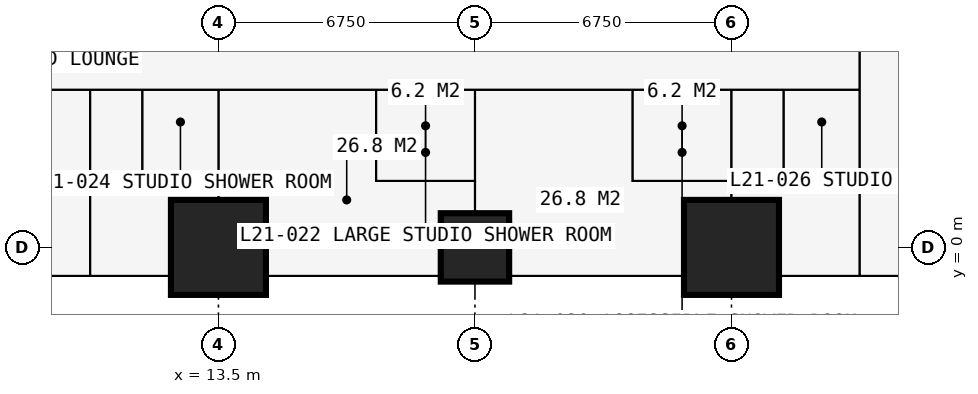
"""IFC4 building model, lengths in metres.
Left out: names, types, materials, properties, quantities, classifications, styles, units other than length and angle.
Written with IfcOpenShell. Run it as: python <this file> out.ifc"""

import sys

from ifc_helpers import new_model, si_unit, direction, frame, frame_2d, origin, origin_2d, place, context, subcontext, project, spatial, rectangle, extrude, element, fill, save


model = new_model("IFC4")
c1 = context("Model", 3, precision=1e-05, world=origin(), true_north=direction((0.0, 1.0)))
c2 = subcontext(c1, "Body", "Model", "MODEL_VIEW")
j1 = project(units=[si_unit("LENGTHUNIT", "METRE"), si_unit("PLANEANGLEUNIT", "RADIAN")], contexts=[c1])
p1 = place(None, origin())
s1 = spatial("IfcSite", under=j1, at=p1, CompositionType="ELEMENT")
p2 = place(p1, origin())
s2 = spatial("IfcBuilding", under=s1, at=p2, CompositionType="ELEMENT")
p3 = place(p2, frame((0.0, 0.0, 80.1)))
s3 = spatial("IfcBuildingStorey", under=s2, at=p3, CompositionType="ELEMENT", Elevation=80.1)
p4 = place(p3, frame((13.5, 0.0, 0.0), z_axis=(0.0, 0.0, 1.0), x_axis=(1.0, 0.0, 0.0)))
e1 = element("IfcColumn", 1, at=p4, inside=s3, PredefinedType="COLUMN", context=c2, shape_type="SweptSolid", body=[
    extrude(rectangle(XDim=2.5, YDim=2.5, at=origin_2d()), origin(), (0.0, 0.0, 1.0), 3.6),
])
p5 = place(p3, frame((20.25, 0.0, 0.0), z_axis=(0.0, 0.0, 1.0), x_axis=(1.0, 0.0, 0.0)))
e2 = element("IfcColumn", 2, at=p5, inside=s3, PredefinedType="COLUMN", context=c2, shape_type="SweptSolid", body=[
    extrude(rectangle(XDim=1.8, YDim=1.8, at=origin_2d()), origin(), (0.0, 0.0, 1.0), 3.6),
])
p6 = place(p3, frame((27.0, 0.0, 0.0), z_axis=(0.0, 0.0, 1.0), x_axis=(1.0, 0.0, 0.0)))
e3 = element("IfcColumn", 3, at=p6, inside=s3, PredefinedType="COLUMN", context=c2, shape_type="SweptSolid", body=[
    extrude(rectangle(XDim=2.5, YDim=2.5, at=origin_2d()), origin(), (0.0, 0.0, 1.0), 3.6),
])
p7 = place(p3, frame((20.25, -0.75, 0.0), z_axis=(0.0, 0.0, 1.0), x_axis=(-1.0, 0.0, 0.0)))
e4 = element("IfcWall", 4, at=p7, inside=s3, PredefinedType="SOLIDWALL", context=c2, shape_type="SweptSolid", body=[
    extrude(rectangle(XDim=6.75, YDim=0.15, at=frame_2d((3.375, 0.0))), origin(), (0.0, 0.0, 1.0), 3.375),
])
p8 = place(p7, frame((0.962, 0.0, 0.0)))
e5 = element("IfcOpeningElement", 5, at=p8, cuts=e4, PredefinedType="OPENING", context=c2, shape_type="SweptSolid", body=[
    extrude(rectangle(XDim=1.0, YDim=2.2, at=frame_2d((0.5, 1.1))), frame((0.0, 0.085, 0.0), z_axis=(0.0, -1.0, 0.0), x_axis=(1.0, 0.0, 0.0)), (0.0, 0.0, 1.0), 0.17),
])
p9 = place(p7, frame((2.025, 0.0, 0.9)))
e6 = element("IfcOpeningElement", 6, at=p9, cuts=e4, PredefinedType="OPENING", context=c2, shape_type="SweptSolid", body=[
    extrude(rectangle(XDim=1.2, YDim=1.8, at=frame_2d((0.6, 0.9))), frame((0.0, 0.085, 0.0), z_axis=(0.0, -1.0, 0.0), x_axis=(1.0, 0.0, 0.0)), (0.0, 0.0, 1.0), 0.17),
])
p10 = place(p7, frame((4.454, 0.0, 0.0)))
e7 = element("IfcOpeningElement", 7, at=p10, cuts=e4, PredefinedType="OPENING", context=c2, shape_type="SweptSolid", body=[
    extrude(rectangle(XDim=1.0, YDim=2.2, at=frame_2d((0.5, 1.1))), frame((0.0, 0.085, 0.0), z_axis=(0.0, -1.0, 0.0), x_axis=(1.0, 0.0, 0.0)), (0.0, 0.0, 1.0), 0.17),
])
p11 = place(p7, frame((3.508, 0.0, 0.9)))
e8 = element("IfcOpeningElement", 8, at=p11, cuts=e4, PredefinedType="OPENING", context=c2, shape_type="SweptSolid", body=[
    extrude(rectangle(XDim=0.9, YDim=1.8, at=frame_2d((0.45, 0.9))), frame((0.0, 0.085, 0.0), z_axis=(0.0, -1.0, 0.0), x_axis=(1.0, 0.0, 0.0)), (0.0, 0.0, 1.0), 0.17),
])
p12 = place(p3, frame((16.875, -0.85, 0.0), z_axis=(0.0, 0.0, 1.0), x_axis=(0.0, -1.0, 0.0)))
e9 = element("IfcWall", 9, at=p12, inside=s3, PredefinedType="USERDEFINED", context=c2, shape_type="SweptSolid", body=[
    extrude(rectangle(XDim=2.2, YDim=1.0, at=frame_2d((1.1, 0.0))), origin(), (0.0, 0.0, 1.0), 0.9),
])
p13 = place(p3, frame((6.75, 4.15, 0.0), z_axis=(0.0, 0.0, 1.0), x_axis=(1.0, 0.0, 0.0)))
e10 = element("IfcWall", 10, at=p13, inside=s3, PredefinedType="PARTITIONING", context=c2, shape_type="SweptSolid", body=[
    extrude(rectangle(XDim=23.625, YDim=0.1, at=frame_2d((11.812, 0.0))), origin(), (0.0, 0.0, 1.0), 3.375),
])
p14 = place(p13, frame((1.2, 0.0, 0.0)))
e11 = element("IfcOpeningElement", 11, at=p14, cuts=e10, PredefinedType="OPENING", context=c2, shape_type="SweptSolid", body=[
    extrude(rectangle(XDim=1.0, YDim=2.2, at=frame_2d((0.5, 1.1))), frame((0.0, 0.06, 0.0), z_axis=(0.0, -1.0, 0.0), x_axis=(1.0, 0.0, 0.0)), (0.0, 0.0, 1.0), 0.12),
])
p15 = place(p13, frame((15.1, 0.0, 0.0)))
e12 = element("IfcOpeningElement", 12, at=p15, cuts=e10, PredefinedType="OPENING", context=c2, shape_type="SweptSolid", body=[
    extrude(rectangle(XDim=0.95, YDim=2.2, at=frame_2d((0.475, 1.1))), frame((0.0, 0.06, 0.0), z_axis=(0.0, -1.0, 0.0), x_axis=(1.0, 0.0, 0.0)), (0.0, 0.0, 1.0), 0.12),
])
p16 = place(p13, frame((8.35, 0.0, 0.0)))
e13 = element("IfcOpeningElement", 13, at=p16, cuts=e10, PredefinedType="OPENING", context=c2, shape_type="SweptSolid", body=[
    extrude(rectangle(XDim=0.95, YDim=2.2, at=frame_2d((0.475, 1.1))), frame((0.0, 0.06, 0.0), z_axis=(0.0, -1.0, 0.0), x_axis=(1.0, 0.0, 0.0)), (0.0, 0.0, 1.0), 0.12),
])
p17 = place(p13, frame((3.575, 0.0, 0.0)))
e14 = element("IfcOpeningElement", 14, at=p17, cuts=e10, PredefinedType="OPENING", context=c2, shape_type="SweptSolid", body=[
    extrude(rectangle(XDim=0.95, YDim=2.2, at=frame_2d((0.475, 1.1))), frame((0.0, 0.06, 0.0), z_axis=(0.0, -1.0, 0.0), x_axis=(1.0, 0.0, 0.0)), (0.0, 0.0, 1.0), 0.12),
])
p18 = place(p13, frame((20.5, 0.0, 0.0)))
e15 = element("IfcOpeningElement", 15, at=p18, cuts=e10, PredefinedType="OPENING", context=c2, shape_type="SweptSolid", body=[
    extrude(rectangle(XDim=0.95, YDim=2.2, at=frame_2d((0.475, 1.1))), frame((0.0, 0.06, 0.0), z_axis=(0.0, -1.0, 0.0), x_axis=(1.0, 0.0, 0.0)), (0.0, 0.0, 1.0), 0.12),
])
p19 = place(p3, frame((10.125, -0.734, 0.0), z_axis=(0.0, 0.0, 1.0), x_axis=(0.0, 1.0, 0.0)))
e16 = element("IfcWall", 16, at=p19, inside=s3, PredefinedType="PARTITIONING", context=c2, shape_type="SweptSolid", body=[
    extrude(rectangle(XDim=4.884, YDim=0.15, at=frame_2d((2.442, 0.0))), origin(), (0.0, 0.0, 1.0), 3.375),
])
p20 = place(p3, frame((11.5, 1.95, 0.0), z_axis=(0.0, 0.0, 1.0), x_axis=(0.0, 1.0, 0.0)))
e17 = element("IfcWall", 17, at=p20, inside=s3, PredefinedType="PARTITIONING", context=c2, shape_type="SweptSolid", body=[
    extrude(rectangle(XDim=2.2, YDim=0.1, at=frame_2d((1.1, 0.0))), origin(), (0.0, 0.0, 1.0), 3.375),
])
p21 = place(p3, frame((11.5, 1.95, 0.0), z_axis=(0.0, 0.0, 1.0), x_axis=(1.0, 0.0, 0.0)))
e18 = element("IfcWall", 18, at=p21, inside=s3, PredefinedType="PARTITIONING", context=c2, shape_type="SweptSolid", body=[
    extrude(rectangle(XDim=2.0, YDim=0.1, at=frame_2d((1.0, 0.0))), origin(), (0.0, 0.0, 1.0), 3.375),
])
p22 = place(p3, frame((13.5, -0.734, 0.0), z_axis=(0.0, 0.0, 1.0), x_axis=(0.0, 1.0, 0.0)))
e19 = element("IfcWall", 19, at=p22, inside=s3, PredefinedType="PARTITIONING", context=c2, shape_type="SweptSolid", body=[
    extrude(rectangle(XDim=4.884, YDim=0.175, at=frame_2d((2.442, 0.0))), origin(), (0.0, 0.0, 1.0), 2.877),
])
p23 = place(p22, frame((3.334, 0.0, 0.0)))
e20 = element("IfcOpeningElement", 20, at=p23, cuts=e19, PredefinedType="OPENING", context=c2, shape_type="SweptSolid", body=[
    extrude(rectangle(XDim=0.9, YDim=2.2, at=frame_2d((0.45, 1.1))), frame((0.0, 0.097, 0.0), z_axis=(0.0, -1.0, 0.0), x_axis=(1.0, 0.0, 0.0)), (0.0, 0.0, 1.0), 0.195),
])
p24 = place(p3, frame((17.65, 1.75, 0.0), z_axis=(0.0, 0.0, 1.0), x_axis=(0.0, 1.0, 0.0)))
e21 = element("IfcWall", 21, at=p24, inside=s3, PredefinedType="PARTITIONING", context=c2, shape_type="SweptSolid", body=[
    extrude(rectangle(XDim=2.4, YDim=0.1, at=frame_2d((1.2, 0.0))), origin(), (0.0, 0.0, 1.0), 3.375),
])
p25 = place(p3, frame((17.65, 1.75, 0.0), z_axis=(0.0, 0.0, 1.0), x_axis=(1.0, 0.0, 0.0)))
e22 = element("IfcWall", 22, at=p25, inside=s3, PredefinedType="PARTITIONING", context=c2, shape_type="SweptSolid", body=[
    extrude(rectangle(XDim=2.6, YDim=0.1, at=frame_2d((1.3, 0.0))), origin(), (0.0, 0.0, 1.0), 3.375),
])
p26 = place(p3, frame((20.25, -0.734, 0.0), z_axis=(0.0, 0.0, 1.0), x_axis=(0.0, 1.0, 0.0)))
e23 = element("IfcWall", 23, at=p26, inside=s3, PredefinedType="PARTITIONING", context=c2, shape_type="SweptSolid", body=[
    extrude(rectangle(XDim=4.884, YDim=0.175, at=frame_2d((2.442, 0.0))), origin(), (0.0, 0.0, 1.0), 2.61),
])
p27 = place(p26, frame((3.234, 0.0, 0.0)))
e24 = element("IfcOpeningElement", 24, at=p27, cuts=e23, PredefinedType="OPENING", context=c2, shape_type="SweptSolid", body=[
    extrude(rectangle(XDim=0.9, YDim=2.2, at=frame_2d((0.45, 1.1))), frame((0.0, 0.097, 0.0), z_axis=(0.0, -1.0, 0.0), x_axis=(1.0, 0.0, 0.0)), (0.0, 0.0, 1.0), 0.195),
])
p28 = place(p3, frame((24.4, 1.75, 0.0), z_axis=(0.0, 0.0, 1.0), x_axis=(0.0, 1.0, 0.0)))
e25 = element("IfcWall", 25, at=p28, inside=s3, PredefinedType="PARTITIONING", context=c2, shape_type="SweptSolid", body=[
    extrude(rectangle(XDim=2.4, YDim=0.1, at=frame_2d((1.2, 0.0))), origin(), (0.0, 0.0, 1.0), 3.375),
])
p29 = place(p3, frame((24.4, 1.75, 0.0), z_axis=(0.0, 0.0, 1.0), x_axis=(1.0, 0.0, 0.0)))
e26 = element("IfcWall", 26, at=p29, inside=s3, PredefinedType="PARTITIONING", context=c2, shape_type="SweptSolid", body=[
    extrude(rectangle(XDim=2.6, YDim=0.1, at=frame_2d((1.3, 0.0))), origin(), (0.0, 0.0, 1.0), 3.375),
])
p30 = place(p29, frame((0.4, 0.0, 0.0)))
e27 = element("IfcOpeningElement", 27, at=p30, cuts=e26, PredefinedType="OPENING", context=c2, shape_type="SweptSolid", body=[
    extrude(rectangle(XDim=0.9, YDim=2.2, at=frame_2d((0.45, 1.1))), frame((0.0, 0.06, 0.0), z_axis=(0.0, -1.0, 0.0), x_axis=(1.0, 0.0, 0.0)), (0.0, 0.0, 1.0), 0.12),
])
p31 = place(p3, frame((27.0, -0.734, 0.0), z_axis=(0.0, 0.0, 1.0), x_axis=(0.0, 1.0, 0.0)))
e28 = element("IfcWall", 28, at=p31, inside=s3, PredefinedType="PARTITIONING", context=c2, shape_type="SweptSolid", body=[
    extrude(rectangle(XDim=4.884, YDim=0.175, at=frame_2d((2.442, 0.0))), origin(), (0.0, 0.0, 1.0), 2.61),
])
p32 = place(p3, frame((28.375, 1.95, 0.0), z_axis=(0.0, 0.0, 1.0), x_axis=(0.0, 1.0, 0.0)))
e29 = element("IfcWall", 29, at=p32, inside=s3, PredefinedType="PARTITIONING", context=c2, shape_type="SweptSolid", body=[
    extrude(rectangle(XDim=2.2, YDim=0.1, at=frame_2d((1.1, 0.0))), origin(), (0.0, 0.0, 1.0), 3.375),
])
p33 = place(p32, frame((0.65, 0.0, 0.0)))
e30 = element("IfcOpeningElement", 30, at=p33, cuts=e29, PredefinedType="OPENING", context=c2, shape_type="SweptSolid", body=[
    extrude(rectangle(XDim=0.9, YDim=2.2, at=frame_2d((0.45, 1.1))), frame((0.0, 0.06, 0.0), z_axis=(0.0, -1.0, 0.0), x_axis=(1.0, 0.0, 0.0)), (0.0, 0.0, 1.0), 0.12),
])
p34 = place(p3, frame((28.375, 1.95, 0.0), z_axis=(0.0, 0.0, 1.0), x_axis=(1.0, 0.0, 0.0)))
e31 = element("IfcWall", 31, at=p34, inside=s3, PredefinedType="PARTITIONING", context=c2, shape_type="SweptSolid", body=[
    extrude(rectangle(XDim=2.0, YDim=0.1, at=frame_2d((1.0, 0.0))), origin(), (0.0, 0.0, 1.0), 3.375),
])
p35 = place(p3, frame((30.375, -0.734, 0.0), z_axis=(0.0, 0.0, 1.0), x_axis=(0.0, 1.0, 0.0)))
e32 = element("IfcWall", 32, at=p35, inside=s3, PredefinedType="PARTITIONING", context=c2, shape_type="SweptSolid", body=[
    extrude(rectangle(XDim=12.034, YDim=0.15, at=frame_2d((6.017, 0.0))), origin(), (0.0, 0.0, 1.0), 3.375),
])
p36 = place(p35, frame((5.134, 0.0, 0.0)))
e33 = element("IfcOpeningElement", 33, at=p36, cuts=e32, PredefinedType="OPENING", context=c2, shape_type="SweptSolid", body=[
    extrude(rectangle(XDim=1.0, YDim=2.2, at=frame_2d((0.5, 1.1))), frame((0.0, 0.085, 0.0), z_axis=(0.0, -1.0, 0.0), x_axis=(1.0, 0.0, 0.0)), (0.0, 0.0, 1.0), 0.17),
])
p37 = place(p8, origin())
e34 = element("IfcDoor", 34, at=p37, inside=s3, OperationType="SINGLE_SWING_LEFT", PredefinedType="DOOR", context=c2, shape_type="SweptSolid", body=[
    extrude(rectangle(XDim=1.0, YDim=2.2, at=frame_2d((0.5, 1.1))), frame((0.0, 0.025, 0.0), z_axis=(0.0, -1.0, 0.0), x_axis=(1.0, 0.0, 0.0)), (0.0, 0.0, 1.0), 0.05),
])
fill(e5, e34)
p38 = place(p9, origin())
e35 = element("IfcWindow", 35, at=p38, inside=s3, PartitioningType="SINGLE_PANEL", PredefinedType="WINDOW", context=c2, shape_type="SweptSolid", body=[
    extrude(rectangle(XDim=1.2, YDim=1.8, at=frame_2d((0.6, 0.9))), frame((0.0, 0.03, 0.0), z_axis=(0.0, -1.0, 0.0), x_axis=(1.0, 0.0, 0.0)), (0.0, 0.0, 1.0), 0.06),
])
fill(e6, e35)
p39 = place(p10, origin())
e36 = element("IfcDoor", 36, at=p39, inside=s3, OperationType="SINGLE_SWING_RIGHT", PredefinedType="DOOR", context=c2, shape_type="SweptSolid", body=[
    extrude(rectangle(XDim=1.0, YDim=2.2, at=frame_2d((0.5, 1.1))), frame((0.0, 0.025, 0.0), z_axis=(0.0, -1.0, 0.0), x_axis=(1.0, 0.0, 0.0)), (0.0, 0.0, 1.0), 0.05),
])
fill(e7, e36)
p40 = place(p11, origin())
e37 = element("IfcWindow", 37, at=p40, inside=s3, PartitioningType="SINGLE_PANEL", PredefinedType="WINDOW", context=c2, shape_type="SweptSolid", body=[
    extrude(rectangle(XDim=0.9, YDim=1.8, at=frame_2d((0.45, 0.9))), frame((0.0, 0.03, 0.0), z_axis=(0.0, -1.0, 0.0), x_axis=(1.0, 0.0, 0.0)), (0.0, 0.0, 1.0), 0.06),
])
fill(e8, e37)
p41 = place(p15, origin())
e38 = element("IfcDoor", 38, at=p41, inside=s3, OperationType="SINGLE_SWING_LEFT", PredefinedType="DOOR", context=c2, shape_type="SweptSolid", body=[
    extrude(rectangle(XDim=0.95, YDim=2.2, at=frame_2d((0.475, 1.1))), frame((0.0, 0.025, 0.0), z_axis=(0.0, -1.0, 0.0), x_axis=(1.0, 0.0, 0.0)), (0.0, 0.0, 1.0), 0.05),
])
fill(e12, e38)
p42 = place(p30, origin())
e39 = element("IfcDoor", 39, at=p42, inside=s3, OperationType="SINGLE_SWING_RIGHT", PredefinedType="DOOR", context=c2, shape_type="SweptSolid", body=[
    extrude(rectangle(XDim=0.9, YDim=2.2, at=frame_2d((0.45, 1.1))), frame((0.0, 0.025, 0.0), z_axis=(0.0, -1.0, 0.0), x_axis=(1.0, 0.0, 0.0)), (0.0, 0.0, 1.0), 0.05),
])
fill(e27, e39)
p43 = place(p16, origin())
e40 = element("IfcDoor", 40, at=p43, inside=s3, OperationType="SINGLE_SWING_LEFT", PredefinedType="DOOR", context=c2, shape_type="SweptSolid", body=[
    extrude(rectangle(XDim=0.95, YDim=2.2, at=frame_2d((0.475, 1.1))), frame((0.0, 0.025, 0.0), z_axis=(0.0, -1.0, 0.0), x_axis=(1.0, 0.0, 0.0)), (0.0, 0.0, 1.0), 0.05),
])
fill(e13, e40)
p44 = place(p27, origin())
e41 = element("IfcDoor", 41, at=p44, inside=s3, OperationType="SINGLE_SWING_RIGHT", PredefinedType="DOOR", context=c2, shape_type="SweptSolid", body=[
    extrude(rectangle(XDim=0.9, YDim=2.2, at=frame_2d((0.45, 1.1))), frame((0.0, 0.025, 0.0), z_axis=(0.0, -1.0, 0.0), x_axis=(1.0, 0.0, 0.0)), (0.0, 0.0, 1.0), 0.05),
])
fill(e24, e41)
p45 = place(p17, origin())
e42 = element("IfcDoor", 42, at=p45, inside=s3, OperationType="SINGLE_SWING_LEFT", PredefinedType="DOOR", context=c2, shape_type="SweptSolid", body=[
    extrude(rectangle(XDim=0.95, YDim=2.2, at=frame_2d((0.475, 1.1))), frame((0.0, 0.025, 0.0), z_axis=(0.0, -1.0, 0.0), x_axis=(1.0, 0.0, 0.0)), (0.0, 0.0, 1.0), 0.05),
])
fill(e14, e42)
p46 = place(p23, origin())
e43 = element("IfcDoor", 43, at=p46, inside=s3, OperationType="SINGLE_SWING_RIGHT", PredefinedType="DOOR", context=c2, shape_type="SweptSolid", body=[
    extrude(rectangle(XDim=0.9, YDim=2.2, at=frame_2d((0.45, 1.1))), frame((0.0, 0.025, 0.0), z_axis=(0.0, -1.0, 0.0), x_axis=(1.0, 0.0, 0.0)), (0.0, 0.0, 1.0), 0.05),
])
fill(e20, e43)
p47 = place(p18, origin())
e44 = element("IfcDoor", 44, at=p47, inside=s3, OperationType="SINGLE_SWING_LEFT", PredefinedType="DOOR", context=c2, shape_type="SweptSolid", body=[
    extrude(rectangle(XDim=0.95, YDim=2.2, at=frame_2d((0.475, 1.1))), frame((0.0, 0.025, 0.0), z_axis=(0.0, -1.0, 0.0), x_axis=(1.0, 0.0, 0.0)), (0.0, 0.0, 1.0), 0.05),
])
fill(e15, e44)
p48 = place(p33, origin())
e45 = element("IfcDoor", 45, at=p48, inside=s3, OperationType="SINGLE_SWING_RIGHT", PredefinedType="DOOR", context=c2, shape_type="SweptSolid", body=[
    extrude(rectangle(XDim=0.9, YDim=2.2, at=frame_2d((0.45, 1.1))), frame((0.0, 0.025, 0.0), z_axis=(0.0, -1.0, 0.0), x_axis=(1.0, 0.0, 0.0)), (0.0, 0.0, 1.0), 0.05),
])
fill(e30, e45)
p49 = place(p36, origin())
e46 = element("IfcDoor", 46, at=p49, inside=s3, OperationType="SINGLE_SWING_LEFT", PredefinedType="DOOR", context=c2, shape_type="SweptSolid", body=[
    extrude(rectangle(XDim=1.0, YDim=2.2, at=frame_2d((0.5, 1.1))), frame((0.0, 0.025, 0.0), z_axis=(0.0, -1.0, 0.0), x_axis=(1.0, 0.0, 0.0)), (0.0, 0.0, 1.0), 0.05),
])
fill(e33, e46)
save(model, sys.argv[1])
